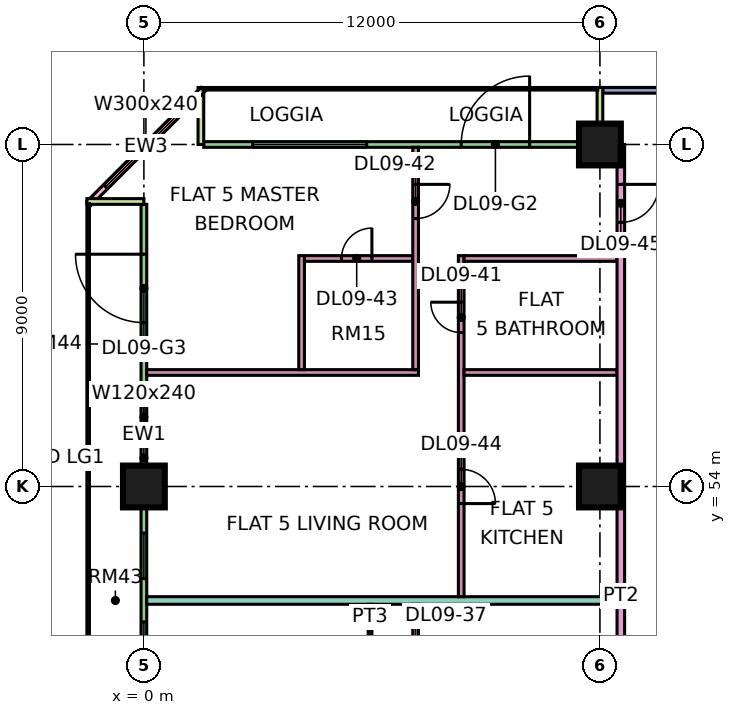
"""IFC4 building model, lengths in metres.
Left out: names, types, materials, properties, quantities, classifications, styles, units other than length and angle.
Written with IfcOpenShell. Run it as: python <this file> out.ifc"""

import sys

from ifc_helpers import new_model, si_unit, direction, frame, frame_2d, origin, origin_2d, place, context, subcontext, project, spatial, rectangle, extrude, element, fill, save


model = new_model("IFC4")
c1 = context("Model", 3, precision=1e-05, world=origin(), true_north=direction((0.0, 1.0)))
c2 = subcontext(c1, "Body", "Model", "MODEL_VIEW")
j1 = project(units=[si_unit("LENGTHUNIT", "METRE"), si_unit("PLANEANGLEUNIT", "RADIAN")], contexts=[c1])
p1 = place(None, origin())
s1 = spatial("IfcSite", under=j1, at=p1, CompositionType="ELEMENT")
p2 = place(p1, origin())
s2 = spatial("IfcBuilding", under=s1, at=p2, CompositionType="ELEMENT")
p3 = place(p2, frame((0.0, 0.0, 48.9)))
s3 = spatial("IfcBuildingStorey", under=s2, at=p3, CompositionType="ELEMENT", Elevation=48.9)
for number, where, z_axis, x_axis in (
    (1, (0.0, 54.0, 0.0), (0.0, 0.0, 1.0), (1.0, 0.0, 0.0)),
    (2, (12.0, 54.0, 0.0), (0.0, 0.0, 1.0), (1.0, 0.0, 0.0)),
    (3, (12.0, 63.0, 0.0), (0.0, 0.0, 1.0), (1.0, 0.0, 0.0)),
):
    element("IfcColumn", number, at=place(p3, frame(where, z_axis=z_axis, x_axis=x_axis)), inside=s3, PredefinedType="COLUMN", context=c2, shape_type="SweptSolid", body=[
        extrude(rectangle(XDim=1.1, YDim=1.1, at=origin_2d()), origin(), (0.0, 0.0, 1.0), 3.75),
    ])
p4 = place(p3, frame((22.5, 64.425, 0.0), z_axis=(0.0, 0.0, 1.0), x_axis=(-1.0, 0.0, 0.0)))
e4 = element("IfcWall", 4, at=p4, inside=s3, PredefinedType="SOLIDWALL", context=c2, shape_type="SweptSolid", body=[
    extrude(rectangle(XDim=10.425, YDim=0.15, at=frame_2d((5.212, 0.0))), origin(), (0.0, 0.0, 1.0), 3.35),
])
p5 = place(p4, frame((0.6, 0.0, 0.45)))
e5 = element("IfcOpeningElement", 5, at=p5, cuts=e4, PredefinedType="OPENING", context=c2, shape_type="SweptSolid", body=[
    extrude(rectangle(XDim=1.8, YDim=2.4, at=frame_2d((0.9, 1.2))), frame((0.0, 0.085, 0.0), z_axis=(0.0, -1.0, 0.0), x_axis=(1.0, 0.0, 0.0)), (0.0, 0.0, 1.0), 0.17),
])
p6 = place(p4, frame((3.45, 0.0, 0.45)))
e6 = element("IfcOpeningElement", 6, at=p6, cuts=e4, PredefinedType="OPENING", context=c2, shape_type="SweptSolid", body=[
    extrude(rectangle(XDim=3.0, YDim=2.4, at=frame_2d((1.5, 1.2))), frame((0.0, 0.085, 0.0), z_axis=(0.0, -1.0, 0.0), x_axis=(1.0, 0.0, 0.0)), (0.0, 0.0, 1.0), 0.17),
])
p7 = place(p3, frame((11.925, 63.0, 0.0), z_axis=(0.0, 0.0, 1.0), x_axis=(-1.0, 0.0, 0.0)))
e7 = element("IfcWall", 7, at=p7, inside=s3, PredefinedType="SOLIDWALL", context=c2, shape_type="SweptSolid", body=[
    extrude(rectangle(XDim=10.35, YDim=0.15, at=frame_2d((5.175, 0.0))), origin(), (0.0, 0.0, 1.0), 3.35),
])
p8 = place(p7, frame((1.775, 0.0, 0.0)))
e8 = element("IfcOpeningElement", 8, at=p8, cuts=e7, PredefinedType="OPENING", context=c2, shape_type="SweptSolid", body=[
    extrude(rectangle(XDim=1.8, YDim=2.4, at=frame_2d((0.9, 1.2))), frame((0.0, 0.085, 0.0), z_axis=(0.0, -1.0, 0.0), x_axis=(1.0, 0.0, 0.0)), (0.0, 0.0, 1.0), 0.17),
])
p9 = place(p7, frame((6.062, 0.0, 0.45)))
e9 = element("IfcOpeningElement", 9, at=p9, cuts=e7, PredefinedType="OPENING", context=c2, shape_type="SweptSolid", body=[
    extrude(rectangle(XDim=3.0, YDim=2.4, at=frame_2d((1.5, 1.2))), frame((0.0, 0.085, 0.0), z_axis=(0.0, -1.0, 0.0), x_axis=(1.0, 0.0, 0.0)), (0.0, 0.0, 1.0), 0.17),
])
for number, where, z_axis, x_axis in (
    (10, (12.0, 64.5, 0.0), (0.0, 0.0, 1.0), (0.0, -1.0, 0.0)),
    (11, (1.5, 64.5, 0.0), (0.0, 0.0, 1.0), (0.0, -1.0, 0.0)),
):
    element("IfcWall", number, at=place(p3, frame(where, z_axis=z_axis, x_axis=x_axis)), inside=s3, PredefinedType="SOLIDWALL", context=c2, shape_type="SweptSolid", body=[
        extrude(rectangle(XDim=1.5, YDim=0.15, at=frame_2d((0.75, 0.0))), origin(), (0.0, 0.0, 1.0), 3.35),
    ])
p10 = place(p3, frame((1.553, 64.447, 0.0), z_axis=(0.0, 0.0, 1.0), x_axis=(-0.707106781187, -0.707106781187, 0.0)))
e12 = element("IfcWall", 12, at=p10, inside=s3, PredefinedType="SOLIDWALL", context=c2, shape_type="SweptSolid", body=[
    extrude(rectangle(XDim=4.243, YDim=0.15, at=frame_2d((2.121, 0.0))), origin(), (0.0, 0.0, 1.0), 3.35),
])
p11 = place(p10, frame((0.621, 0.0, 0.45)))
e13 = element("IfcOpeningElement", 13, at=p11, cuts=e12, PredefinedType="OPENING", context=c2, shape_type="SweptSolid", body=[
    extrude(rectangle(XDim=3.0, YDim=2.4, at=frame_2d((1.5, 1.2))), frame((0.0, 0.085, 0.0), z_axis=(0.0, -1.0, 0.0), x_axis=(1.0, 0.0, 0.0)), (0.0, 0.0, 1.0), 0.17),
])
p12 = place(p3, frame((0.0, 61.425, 0.0), z_axis=(0.0, 0.0, 1.0), x_axis=(0.0, -1.0, 0.0)))
e14 = element("IfcWall", 14, at=p12, inside=s3, PredefinedType="SOLIDWALL", context=c2, shape_type="SweptSolid", body=[
    extrude(rectangle(XDim=13.35, YDim=0.15, at=frame_2d((6.675, 0.0))), origin(), (0.0, 0.0, 1.0), 3.35),
])
p13 = place(p12, frame((1.312, 0.0, 0.0)))
e15 = element("IfcOpeningElement", 15, at=p13, cuts=e14, PredefinedType="OPENING", context=c2, shape_type="SweptSolid", body=[
    extrude(rectangle(XDim=1.8, YDim=2.4, at=frame_2d((0.9, 1.2))), frame((0.0, 0.085, 0.0), z_axis=(0.0, -1.0, 0.0), x_axis=(1.0, 0.0, 0.0)), (0.0, 0.0, 1.0), 0.17),
])
p14 = place(p12, frame((5.0, 0.0, 0.45)))
e16 = element("IfcOpeningElement", 16, at=p14, cuts=e14, PredefinedType="OPENING", context=c2, shape_type="SweptSolid", body=[
    extrude(rectangle(XDim=1.2, YDim=2.4, at=frame_2d((0.6, 1.2))), frame((0.0, 0.085, 0.0), z_axis=(0.0, -1.0, 0.0), x_axis=(1.0, 0.0, 0.0)), (0.0, 0.0, 1.0), 0.17),
])
p15 = place(p12, frame((8.65, 0.0, 0.45)))
e17 = element("IfcOpeningElement", 17, at=p15, cuts=e14, PredefinedType="OPENING", context=c2, shape_type="SweptSolid", body=[
    extrude(rectangle(XDim=1.2, YDim=2.4, at=frame_2d((0.6, 1.2))), frame((0.0, 0.085, 0.0), z_axis=(0.0, -1.0, 0.0), x_axis=(1.0, 0.0, 0.0)), (0.0, 0.0, 1.0), 0.17),
])
p16 = place(p12, frame((10.988, 0.0, 0.45)))
e18 = element("IfcOpeningElement", 18, at=p16, cuts=e14, PredefinedType="OPENING", context=c2, shape_type="SweptSolid", body=[
    extrude(rectangle(XDim=1.8, YDim=2.4, at=frame_2d((0.9, 1.2))), frame((0.0, 0.085, 0.0), z_axis=(0.0, -1.0, 0.0), x_axis=(1.0, 0.0, 0.0)), (0.0, 0.0, 1.0), 0.17),
])
p17 = place(p3, frame((-1.5, 61.5, 0.0), z_axis=(0.0, 0.0, 1.0), x_axis=(1.0, 0.0, 0.0)))
e19 = element("IfcWall", 19, at=p17, inside=s3, PredefinedType="SOLIDWALL", context=c2, shape_type="SweptSolid", body=[
    extrude(rectangle(XDim=1.5, YDim=0.15, at=frame_2d((0.75, 0.0))), origin(), (0.0, 0.0, 1.0), 3.35),
])
p18 = place(p3, frame((0.074, 51.0, 0.0), z_axis=(0.0, 0.0, 1.0), x_axis=(1.0, 0.0, 0.0)))
e20 = element("IfcWall", 20, at=p18, inside=s3, PredefinedType="PARTITIONING", context=c2, shape_type="SweptSolid", body=[
    extrude(rectangle(XDim=12.376, YDim=0.2, at=frame_2d((6.188, 0.0))), origin(), (0.0, 0.0, 1.0), 3.35),
])
p19 = place(p3, frame((0.074, 57.0, 0.0), z_axis=(0.0, 0.0, 1.0), x_axis=(1.0, 0.0, 0.0)))
e21 = element("IfcWall", 21, at=p19, inside=s3, PredefinedType="PARTITIONING", context=c2, shape_type="SweptSolid", body=[
    extrude(rectangle(XDim=7.151, YDim=0.15, at=frame_2d((3.576, 0.0))), origin(), (0.0, 0.0, 1.0), 3.35),
])
p20 = place(p3, frame((4.15, 57.075, 0.0), z_axis=(0.0, 0.0, 1.0), x_axis=(0.0, 1.0, 0.0)))
e22 = element("IfcWall", 22, at=p20, inside=s3, PredefinedType="PARTITIONING", context=c2, shape_type="SweptSolid", body=[
    extrude(rectangle(XDim=3.0, YDim=0.15, at=frame_2d((1.5, 0.0))), origin(), (0.0, 0.0, 1.0), 3.35),
])
p21 = place(p3, frame((4.225, 60.0, 0.0), z_axis=(0.0, 0.0, 1.0), x_axis=(1.0, 0.0, 0.0)))
e23 = element("IfcWall", 23, at=p21, inside=s3, PredefinedType="PARTITIONING", context=c2, shape_type="SweptSolid", body=[
    extrude(rectangle(XDim=2.85, YDim=0.15, at=frame_2d((1.425, 0.0))), origin(), (0.0, 0.0, 1.0), 3.35),
])
p22 = place(p21, frame((0.975, 0.0, 0.0)))
e24 = element("IfcOpeningElement", 24, at=p22, cuts=e23, PredefinedType="OPENING", context=c2, shape_type="SweptSolid", body=[
    extrude(rectangle(XDim=0.8, YDim=2.1, at=frame_2d((0.4, 1.05))), frame((0.0, 0.085, 0.0), z_axis=(0.0, -1.0, 0.0), x_axis=(1.0, 0.0, 0.0)), (0.0, 0.0, 1.0), 0.17),
])
p23 = place(p3, frame((5.95, 48.05, 0.0), z_axis=(0.0, 0.0, 1.0), x_axis=(0.0, 1.0, 0.0)))
e25 = element("IfcWall", 25, at=p23, inside=s3, PredefinedType="PARTITIONING", context=c2, shape_type="SweptSolid", body=[
    extrude(rectangle(XDim=2.85, YDim=0.1, at=frame_2d((1.425, 0.0))), origin(), (0.0, 0.0, 1.0), 3.35),
])
p24 = place(p23, frame((1.0, 0.0, 0.0)))
e26 = element("IfcOpeningElement", 26, at=p24, cuts=e25, PredefinedType="OPENING", context=c2, shape_type="SweptSolid", body=[
    extrude(rectangle(XDim=0.9, YDim=2.1, at=frame_2d((0.45, 1.05))), frame((0.0, 0.06, 0.0), z_axis=(0.0, -1.0, 0.0), x_axis=(1.0, 0.0, 0.0)), (0.0, 0.0, 1.0), 0.12),
])
p25 = place(p3, frame((7.15, 44.325, 0.0), z_axis=(0.0, 0.0, 1.0), x_axis=(0.0, 1.0, 0.0)))
e27 = element("IfcWall", 27, at=p25, inside=s3, PredefinedType="PARTITIONING", context=c2, shape_type="SweptSolid", body=[
    extrude(rectangle(XDim=6.575, YDim=0.15, at=frame_2d((3.288, 0.0))), origin(), (0.0, 0.0, 1.0), 3.35),
])
p26 = place(p25, frame((4.425, 0.0, 0.0)))
e28 = element("IfcOpeningElement", 28, at=p26, cuts=e27, PredefinedType="OPENING", context=c2, shape_type="SweptSolid", body=[
    extrude(rectangle(XDim=0.9, YDim=2.1, at=frame_2d((0.45, 1.05))), frame((0.0, 0.085, 0.0), z_axis=(0.0, -1.0, 0.0), x_axis=(1.0, 0.0, 0.0)), (0.0, 0.0, 1.0), 0.17),
])
p27 = place(p25, frame((1.125, 0.0, 0.0)))
e29 = element("IfcOpeningElement", 29, at=p27, cuts=e27, PredefinedType="OPENING", context=c2, shape_type="SweptSolid", body=[
    extrude(rectangle(XDim=0.8, YDim=2.1, at=frame_2d((0.4, 1.05))), frame((0.0, 0.085, 0.0), z_axis=(0.0, -1.0, 0.0), x_axis=(1.0, 0.0, 0.0)), (0.0, 0.0, 1.0), 0.17),
])
p28 = place(p3, frame((7.15, 57.075, 0.0), z_axis=(0.0, 0.0, 1.0), x_axis=(0.0, 1.0, 0.0)))
e30 = element("IfcWall", 30, at=p28, inside=s3, PredefinedType="PARTITIONING", context=c2, shape_type="SweptSolid", body=[
    extrude(rectangle(XDim=5.851, YDim=0.15, at=frame_2d((2.926, 0.0))), origin(), (0.0, 0.0, 1.0), 3.35),
])
p29 = place(p28, frame((3.975, 0.0, 0.0)))
e31 = element("IfcOpeningElement", 31, at=p29, cuts=e30, PredefinedType="OPENING", context=c2, shape_type="SweptSolid", body=[
    extrude(rectangle(XDim=0.9, YDim=2.1, at=frame_2d((0.45, 1.05))), frame((0.0, 0.085, 0.0), z_axis=(0.0, -1.0, 0.0), x_axis=(1.0, 0.0, 0.0)), (0.0, 0.0, 1.0), 0.17),
])
p30 = place(p3, frame((8.35, 51.1, 0.0), z_axis=(0.0, 0.0, 1.0), x_axis=(0.0, 1.0, 0.0)))
e32 = element("IfcWall", 32, at=p30, inside=s3, PredefinedType="PARTITIONING", context=c2, shape_type="SweptSolid", body=[
    extrude(rectangle(XDim=8.975, YDim=0.15, at=frame_2d((4.487, 0.0))), origin(), (0.0, 0.0, 1.0), 3.35),
])
p31 = place(p30, frame((6.95, 0.0, 0.0)))
e33 = element("IfcOpeningElement", 33, at=p31, cuts=e32, PredefinedType="OPENING", context=c2, shape_type="SweptSolid", body=[
    extrude(rectangle(XDim=0.8, YDim=2.1, at=frame_2d((0.4, 1.05))), frame((0.0, 0.085, 0.0), z_axis=(0.0, -1.0, 0.0), x_axis=(1.0, 0.0, 0.0)), (0.0, 0.0, 1.0), 0.17),
])
p32 = place(p30, frame((2.45, 0.0, 0.0)))
e34 = element("IfcOpeningElement", 34, at=p32, cuts=e32, PredefinedType="OPENING", context=c2, shape_type="SweptSolid", body=[
    extrude(rectangle(XDim=0.9, YDim=2.1, at=frame_2d((0.45, 1.05))), frame((0.0, 0.085, 0.0), z_axis=(0.0, -1.0, 0.0), x_axis=(1.0, 0.0, 0.0)), (0.0, 0.0, 1.0), 0.17),
])
for number, where, z_axis, x_axis in (
    (35, (8.425, 57.0, 0.0), (0.0, 0.0, 1.0), (1.0, 0.0, 0.0)),
    (36, (8.425, 60.0, 0.0), (0.0, 0.0, 1.0), (1.0, 0.0, 0.0)),
):
    element("IfcWall", number, at=place(p3, frame(where, z_axis=z_axis, x_axis=x_axis)), inside=s3, PredefinedType="PARTITIONING", context=c2, shape_type="SweptSolid", body=[
        extrude(rectangle(XDim=4.025, YDim=0.15, at=frame_2d((2.012, 0.0))), origin(), (0.0, 0.0, 1.0), 3.35),
    ])
p33 = place(p3, frame((12.55, 39.225, 0.0), z_axis=(0.0, 0.0, 1.0), x_axis=(0.0, 1.0, 0.0)))
e37 = element("IfcWall", 37, at=p33, inside=s3, PredefinedType="PARTITIONING", context=c2, shape_type="SweptSolid", body=[
    extrude(rectangle(XDim=23.775, YDim=0.2, at=frame_2d((11.887, 0.0))), origin(), (0.0, 0.0, 1.0), 3.35),
])
p34 = place(p33, frame((3.725, 0.0, 0.0)))
e38 = element("IfcOpeningElement", 38, at=p34, cuts=e37, PredefinedType="OPENING", context=c2, shape_type="SweptSolid", body=[
    extrude(rectangle(XDim=1.0, YDim=2.1, at=frame_2d((0.5, 1.05))), frame((0.0, 0.11, 0.0), z_axis=(0.0, -1.0, 0.0), x_axis=(1.0, 0.0, 0.0)), (0.0, 0.0, 1.0), 0.22),
])
p35 = place(p33, frame((21.725, 0.0, 0.0)))
e39 = element("IfcOpeningElement", 39, at=p35, cuts=e37, PredefinedType="OPENING", context=c2, shape_type="SweptSolid", body=[
    extrude(rectangle(XDim=1.0, YDim=2.1, at=frame_2d((0.5, 1.05))), frame((0.0, 0.11, 0.0), z_axis=(0.0, -1.0, 0.0), x_axis=(1.0, 0.0, 0.0)), (0.0, 0.0, 1.0), 0.22),
])
p36 = place(p8, frame((1.8, 0.0, 0.0), z_axis=(0.0, 0.0, 1.0), x_axis=(-1.0, 0.0, 0.0)))
e40 = element("IfcDoor", 40, at=p36, inside=s3, OperationType="DOUBLE_DOOR_SINGLE_SWING", PredefinedType="DOOR", context=c2, shape_type="SweptSolid", body=[
    extrude(rectangle(XDim=1.8, YDim=2.4, at=frame_2d((0.9, 1.2))), frame((0.0, 0.025, 0.0), z_axis=(0.0, -1.0, 0.0), x_axis=(1.0, 0.0, 0.0)), (0.0, 0.0, 1.0), 0.05),
])
fill(e8, e40)
p37 = place(p9, origin())
e41 = element("IfcWindow", 41, at=p37, inside=s3, PartitioningType="SINGLE_PANEL", PredefinedType="WINDOW", context=c2, shape_type="SweptSolid", body=[
    extrude(rectangle(XDim=3.0, YDim=2.4, at=frame_2d((1.5, 1.2))), frame((0.0, 0.03, 0.0), z_axis=(0.0, -1.0, 0.0), x_axis=(1.0, 0.0, 0.0)), (0.0, 0.0, 1.0), 0.06),
])
fill(e9, e41)
p38 = place(p11, origin())
e42 = element("IfcWindow", 42, at=p38, inside=s3, PartitioningType="SINGLE_PANEL", PredefinedType="WINDOW", context=c2, shape_type="SweptSolid", body=[
    extrude(rectangle(XDim=3.0, YDim=2.4, at=frame_2d((1.5, 1.2))), frame((0.0, 0.03, 0.0), z_axis=(0.0, -1.0, 0.0), x_axis=(1.0, 0.0, 0.0)), (0.0, 0.0, 1.0), 0.06),
])
fill(e13, e42)
p39 = place(p13, frame((1.8, 0.0, 0.0), z_axis=(0.0, 0.0, 1.0), x_axis=(-1.0, 0.0, 0.0)))
e43 = element("IfcDoor", 43, at=p39, inside=s3, OperationType="DOUBLE_DOOR_SINGLE_SWING", PredefinedType="DOOR", context=c2, shape_type="SweptSolid", body=[
    extrude(rectangle(XDim=1.8, YDim=2.4, at=frame_2d((0.9, 1.2))), frame((0.0, 0.025, 0.0), z_axis=(0.0, -1.0, 0.0), x_axis=(1.0, 0.0, 0.0)), (0.0, 0.0, 1.0), 0.05),
])
fill(e15, e43)
p40 = place(p14, origin())
e44 = element("IfcWindow", 44, at=p40, inside=s3, PartitioningType="SINGLE_PANEL", PredefinedType="WINDOW", context=c2, shape_type="SweptSolid", body=[
    extrude(rectangle(XDim=1.2, YDim=2.4, at=frame_2d((0.6, 1.2))), frame((0.0, 0.03, 0.0), z_axis=(0.0, -1.0, 0.0), x_axis=(1.0, 0.0, 0.0)), (0.0, 0.0, 1.0), 0.06),
])
fill(e16, e44)
p41 = place(p15, origin())
e45 = element("IfcWindow", 45, at=p41, inside=s3, PartitioningType="SINGLE_PANEL", PredefinedType="WINDOW", context=c2, shape_type="SweptSolid", body=[
    extrude(rectangle(XDim=1.2, YDim=2.4, at=frame_2d((0.6, 1.2))), frame((0.0, 0.03, 0.0), z_axis=(0.0, -1.0, 0.0), x_axis=(1.0, 0.0, 0.0)), (0.0, 0.0, 1.0), 0.06),
])
fill(e17, e45)
p42 = place(p16, origin())
e46 = element("IfcWindow", 46, at=p42, inside=s3, PartitioningType="SINGLE_PANEL", PredefinedType="WINDOW", context=c2, shape_type="SweptSolid", body=[
    extrude(rectangle(XDim=1.8, YDim=2.4, at=frame_2d((0.9, 1.2))), frame((0.0, 0.03, 0.0), z_axis=(0.0, -1.0, 0.0), x_axis=(1.0, 0.0, 0.0)), (0.0, 0.0, 1.0), 0.06),
])
fill(e18, e46)
p43 = place(p31, frame((0.8, 0.0, 0.0), z_axis=(0.0, 0.0, 1.0), x_axis=(-1.0, 0.0, 0.0)))
e47 = element("IfcDoor", 47, at=p43, inside=s3, OperationType="SINGLE_SWING_RIGHT", PredefinedType="DOOR", context=c2, shape_type="SweptSolid", body=[
    extrude(rectangle(XDim=0.8, YDim=2.1, at=frame_2d((0.4, 1.05))), frame((0.0, 0.025, 0.0), z_axis=(0.0, -1.0, 0.0), x_axis=(1.0, 0.0, 0.0)), (0.0, 0.0, 1.0), 0.05),
])
fill(e33, e47)
p44 = place(p29, origin())
e48 = element("IfcDoor", 48, at=p44, inside=s3, OperationType="SINGLE_SWING_RIGHT", PredefinedType="DOOR", context=c2, shape_type="SweptSolid", body=[
    extrude(rectangle(XDim=0.9, YDim=2.1, at=frame_2d((0.45, 1.05))), frame((0.0, 0.025, 0.0), z_axis=(0.0, -1.0, 0.0), x_axis=(1.0, 0.0, 0.0)), (0.0, 0.0, 1.0), 0.05),
])
fill(e31, e48)
p45 = place(p22, frame((0.8, 0.0, 0.0), z_axis=(0.0, 0.0, 1.0), x_axis=(-1.0, 0.0, 0.0)))
e49 = element("IfcDoor", 49, at=p45, inside=s3, OperationType="SINGLE_SWING_RIGHT", PredefinedType="DOOR", context=c2, shape_type="SweptSolid", body=[
    extrude(rectangle(XDim=0.8, YDim=2.1, at=frame_2d((0.4, 1.05))), frame((0.0, 0.025, 0.0), z_axis=(0.0, -1.0, 0.0), x_axis=(1.0, 0.0, 0.0)), (0.0, 0.0, 1.0), 0.05),
])
fill(e24, e49)
p46 = place(p32, frame((0.9, 0.0, 0.0), z_axis=(0.0, 0.0, 1.0), x_axis=(-1.0, 0.0, 0.0)))
e50 = element("IfcDoor", 50, at=p46, inside=s3, OperationType="SINGLE_SWING_LEFT", PredefinedType="DOOR", context=c2, shape_type="SweptSolid", body=[
    extrude(rectangle(XDim=0.9, YDim=2.1, at=frame_2d((0.45, 1.05))), frame((0.0, 0.025, 0.0), z_axis=(0.0, -1.0, 0.0), x_axis=(1.0, 0.0, 0.0)), (0.0, 0.0, 1.0), 0.05),
])
fill(e34, e50)
p47 = place(p35, origin())
e51 = element("IfcDoor", 51, at=p47, inside=s3, OperationType="SINGLE_SWING_RIGHT", PredefinedType="DOOR", context=c2, shape_type="SweptSolid", body=[
    extrude(rectangle(XDim=1.0, YDim=2.1, at=frame_2d((0.5, 1.05))), frame((0.0, 0.025, 0.0), z_axis=(0.0, -1.0, 0.0), x_axis=(1.0, 0.0, 0.0)), (0.0, 0.0, 1.0), 0.05),
])
fill(e39, e51)
save(model, sys.argv[1])
